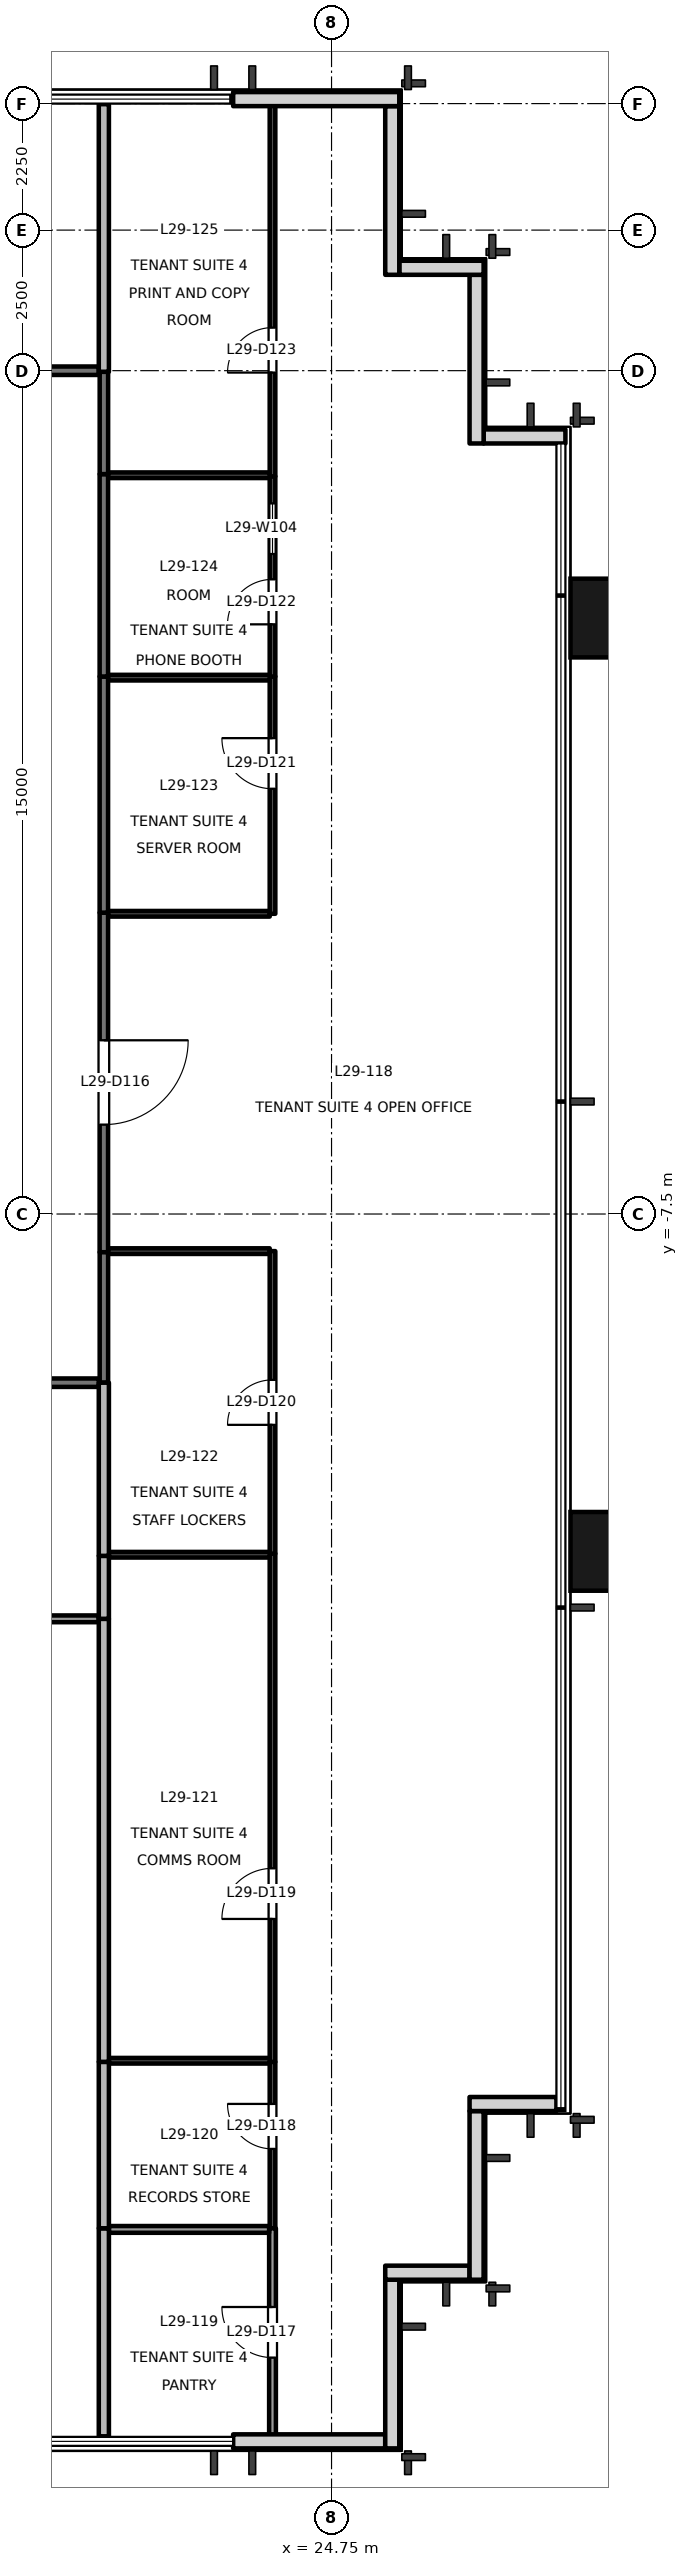
"""IFC4 building model, lengths in metres.
Left out: names, types, materials, properties, quantities, classifications, styles, units other than length and angle.
Written with IfcOpenShell. Run it as: python <this file> out.ifc"""

import sys

from ifc_helpers import new_model, si_unit, direction, frame, frame_2d, origin, origin_2d, place, context, subcontext, project, spatial, rectangle, extrude, element, fill, save


model = new_model("IFC4")
c1 = context("Model", 3, precision=1e-05, world=origin(), true_north=direction((0.0, 1.0)))
c2 = subcontext(c1, "Body", "Model", "MODEL_VIEW")
j1 = project(units=[si_unit("LENGTHUNIT", "METRE"), si_unit("PLANEANGLEUNIT", "RADIAN")], contexts=[c1])
p1 = place(None, origin())
s1 = spatial("IfcSite", under=j1, at=p1, CompositionType="ELEMENT")
p2 = place(p1, origin())
s2 = spatial("IfcBuilding", under=s1, at=p2, CompositionType="ELEMENT")
p3 = place(p2, frame((0.0, 0.0, 130.1)))
s3 = spatial("IfcBuildingStorey", under=s2, at=p3, CompositionType="ELEMENT", Elevation=130.1)
for number, where, z_axis, x_axis in (
    (1, (29.9, -13.5, -0.2), (0.0, 0.0, 1.0), (0.0, 1.0, 0.0)),
    (2, (29.9, 3.1, -0.2), (0.0, 0.0, 1.0), (0.0, 1.0, 0.0)),
):
    element("IfcColumn", number, at=place(p3, frame(where, z_axis=z_axis, x_axis=x_axis)), inside=s3, PredefinedType="COLUMN", context=c2, shape_type="SweptSolid", body=[
        extrude(rectangle(XDim=1.4, YDim=1.8, at=origin_2d()), origin(), (0.0, 0.0, 1.0), 4.0),
    ])
p4 = place(p3, frame((23.0, -29.33, 0.0), z_axis=(0.0, 0.0, 1.0), x_axis=(1.0, 0.0, 0.0)))
e3 = element("IfcWall", 3, at=p4, inside=s3, PredefinedType="SOLIDWALL", context=c2, shape_type="SweptSolid", body=[
    extrude(rectangle(XDim=2.705, YDim=0.25, at=frame_2d((1.353, 0.0))), origin(), (0.0, 0.0, 1.0), 3.8),
])
p5 = place(p3, frame((25.83, -29.455, 0.0), z_axis=(0.0, 0.0, 1.0), x_axis=(0.0, 1.0, 0.0)))
e4 = element("IfcWall", 4, at=p5, inside=s3, PredefinedType="SOLIDWALL", context=c2, shape_type="SweptSolid", body=[
    extrude(rectangle(XDim=3.0, YDim=0.25, at=frame_2d((1.5, 0.0))), origin(), (0.0, 0.0, 1.0), 3.8),
])
p6 = place(p3, frame((25.705, -26.33, 0.0), z_axis=(0.0, 0.0, 1.0), x_axis=(1.0, 0.0, 0.0)))
e5 = element("IfcWall", 5, at=p6, inside=s3, PredefinedType="SOLIDWALL", context=c2, shape_type="SweptSolid", body=[
    extrude(rectangle(XDim=1.5, YDim=0.25, at=frame_2d((0.75, 0.0))), origin(), (0.0, 0.0, 1.0), 3.8),
])
p7 = place(p3, frame((27.33, -26.455, 0.0), z_axis=(0.0, 0.0, 1.0), x_axis=(0.0, 1.0, 0.0)))
e6 = element("IfcWall", 6, at=p7, inside=s3, PredefinedType="SOLIDWALL", context=c2, shape_type="SweptSolid", body=[
    extrude(rectangle(XDim=3.0, YDim=0.25, at=frame_2d((1.5, 0.0))), origin(), (0.0, 0.0, 1.0), 3.8),
])
p8 = place(p3, frame((27.205, -23.33, 0.0), z_axis=(0.0, 0.0, 1.0), x_axis=(1.0, 0.0, 0.0)))
e7 = element("IfcWall", 7, at=p8, inside=s3, PredefinedType="SOLIDWALL", context=c2, shape_type="SweptSolid", body=[
    extrude(rectangle(XDim=1.545, YDim=0.25, at=frame_2d((0.772, 0.0))), origin(), (0.0, 0.0, 1.0), 3.8),
])
p9 = place(p3, frame((28.91, 6.33, 0.0), z_axis=(0.0, 0.0, 1.0), x_axis=(-1.0, 0.0, 0.0)))
e8 = element("IfcWall", 8, at=p9, inside=s3, PredefinedType="SOLIDWALL", context=c2, shape_type="SweptSolid", body=[
    extrude(rectangle(XDim=1.455, YDim=0.25, at=frame_2d((0.728, 0.0))), origin(), (0.0, 0.0, 1.0), 3.8),
])
p10 = place(p3, frame((27.33, 6.205, 0.0), z_axis=(0.0, 0.0, 1.0), x_axis=(0.0, 1.0, 0.0)))
e9 = element("IfcWall", 9, at=p10, inside=s3, PredefinedType="SOLIDWALL", context=c2, shape_type="SweptSolid", body=[
    extrude(rectangle(XDim=3.0, YDim=0.25, at=frame_2d((1.5, 0.0))), origin(), (0.0, 0.0, 1.0), 3.8),
])
p11 = place(p3, frame((27.455, 9.33, 0.0), z_axis=(0.0, 0.0, 1.0), x_axis=(-1.0, 0.0, 0.0)))
e10 = element("IfcWall", 10, at=p11, inside=s3, PredefinedType="SOLIDWALL", context=c2, shape_type="SweptSolid", body=[
    extrude(rectangle(XDim=1.5, YDim=0.25, at=frame_2d((0.75, 0.0))), origin(), (0.0, 0.0, 1.0), 3.8),
])
p12 = place(p3, frame((25.83, 9.205, 0.0), z_axis=(0.0, 0.0, 1.0), x_axis=(0.0, 1.0, 0.0)))
e11 = element("IfcWall", 11, at=p12, inside=s3, PredefinedType="SOLIDWALL", context=c2, shape_type="SweptSolid", body=[
    extrude(rectangle(XDim=3.0, YDim=0.25, at=frame_2d((1.5, 0.0))), origin(), (0.0, 0.0, 1.0), 3.8),
])
p13 = place(p3, frame((25.955, 12.33, 0.0), z_axis=(0.0, 0.0, 1.0), x_axis=(-1.0, 0.0, 0.0)))
e12 = element("IfcWall", 12, at=p13, inside=s3, PredefinedType="SOLIDWALL", context=c2, shape_type="SweptSolid", body=[
    extrude(rectangle(XDim=2.955, YDim=0.25, at=frame_2d((1.478, 0.0))), origin(), (0.0, 0.0, 1.0), 3.8),
])
p14 = place(p3, frame((20.61, -10.5, 0.0), z_axis=(0.0, 0.0, 1.0), x_axis=(-1.0, 0.0, 0.0)))
e13 = element("IfcWall", 13, at=p14, inside=s3, PredefinedType="PARTITIONING", context=c2, shape_type="SweptSolid", body=[
    extrude(rectangle(XDim=8.463, YDim=0.15, at=frame_2d((4.231, 0.0))), origin(), (0.0, 0.0, 1.0), 2.9),
])
p15 = place(p3, frame((20.7, -2.14, 0.0), z_axis=(0.0, 0.0, 1.0), x_axis=(0.0, -1.0, 0.0)))
e14 = element("IfcWall", 14, at=p15, inside=s3, PredefinedType="PARTITIONING", context=c2, shape_type="SweptSolid", body=[
    extrude(rectangle(XDim=6.04, YDim=0.15, at=frame_2d((3.02, 0.0))), origin(), (0.0, 0.0, 1.0), 3.3),
])
p16 = place(p15, frame((2.27, 0.0, 0.0)))
e15 = element("IfcOpeningElement", 15, at=p16, cuts=e14, PredefinedType="OPENING", context=c2, shape_type="SweptSolid", body=[
    extrude(rectangle(XDim=1.5, YDim=2.1, at=frame_2d((0.75, 1.05))), frame((0.0, 0.085, 0.0), z_axis=(0.0, -1.0, 0.0), x_axis=(1.0, 0.0, 0.0)), (0.0, 0.0, 1.0), 0.171),
])
p17 = place(p3, frame((20.701, -8.18, 0.0), z_axis=(0.0, 0.0, 1.0), x_axis=(0.0, -1.0, 0.0)))
e16 = element("IfcWall", 16, at=p17, inside=s3, PredefinedType="PARTITIONING", context=c2, shape_type="SweptSolid", body=[
    extrude(rectangle(XDim=2.32, YDim=0.15, at=frame_2d((1.16, 0.0))), origin(), (0.0, 0.0, 1.0), 3.8),
])
p18 = place(p3, frame((20.7, 2.06, 0.0), z_axis=(0.0, 0.0, 1.0), x_axis=(0.0, -1.0, 0.0)))
e17 = element("IfcWall", 17, at=p18, inside=s3, PredefinedType="PARTITIONING", context=c2, shape_type="SweptSolid", body=[
    extrude(rectangle(XDim=4.2, YDim=0.15, at=frame_2d((2.1, 0.0))), origin(), (0.0, 0.0, 1.0), 3.3),
])
p19 = place(p3, frame((20.7, 5.66, 0.0), z_axis=(0.0, 0.0, 1.0), x_axis=(0.0, -1.0, 0.0)))
e18 = element("IfcWall", 18, at=p19, inside=s3, PredefinedType="PARTITIONING", context=c2, shape_type="SweptSolid", body=[
    extrude(rectangle(XDim=3.6, YDim=0.15, at=frame_2d((1.8, 0.0))), origin(), (0.0, 0.0, 1.0), 3.3),
])
p20 = place(p3, frame((20.701, 7.48, 0.0), z_axis=(0.0, 0.0, 1.0), x_axis=(0.0, -1.0, 0.0)))
e19 = element("IfcWall", 19, at=p20, inside=s3, PredefinedType="PARTITIONING", context=c2, shape_type="SweptSolid", body=[
    extrude(rectangle(XDim=1.82, YDim=0.15, at=frame_2d((0.91, 0.0))), origin(), (0.0, 0.0, 1.0), 3.8),
])
p21 = place(p3, frame((18.0, 7.499, 0.0), z_axis=(0.0, 0.0, 1.0), x_axis=(1.0, 0.0, 0.0)))
e20 = element("IfcWall", 20, at=p21, inside=s3, PredefinedType="PARTITIONING", context=c2, shape_type="SweptSolid", body=[
    extrude(rectangle(XDim=2.61, YDim=0.15, at=frame_2d((1.305, 0.0))), origin(), (0.0, 0.0, 1.0), 3.8),
])
p22 = place(p3, frame((12.167, -14.7, 0.0), z_axis=(0.0, 0.0, 1.0), x_axis=(1.0, 0.0, 0.0)))
e21 = element("IfcWall", 21, at=p22, inside=s3, PredefinedType="PARTITIONING", context=c2, shape_type="SweptSolid", body=[
    extrude(rectangle(XDim=8.443, YDim=0.12, at=frame_2d((4.222, 0.0))), origin(), (0.0, 0.0, 1.0), 2.9),
])
p23 = place(p22, frame((3.771, 0.0, 0.0)))
e22 = element("IfcOpeningElement", 22, at=p23, cuts=e21, PredefinedType="OPENING", context=c2, shape_type="SweptSolid", body=[
    extrude(rectangle(XDim=0.9, YDim=2.1, at=frame_2d((0.45, 1.05))), frame((0.0, 0.071, 0.0), z_axis=(0.0, -1.0, 0.0), x_axis=(1.0, 0.0, 0.0)), (0.0, 0.0, 1.0), 0.141),
])
p24 = place(p3, frame((20.7, -25.54, 0.0), z_axis=(0.0, 0.0, 1.0), x_axis=(0.0, -1.0, 0.0)))
e23 = element("IfcWall", 23, at=p24, inside=s3, PredefinedType="PARTITIONING", context=c2, shape_type="SweptSolid", body=[
    extrude(rectangle(XDim=3.7, YDim=0.18, at=frame_2d((1.85, 0.0))), origin(), (0.0, 0.0, 1.0), 3.8),
])
p25 = place(p3, frame((20.7, -22.58, 0.0), z_axis=(0.0, 0.0, 1.0), x_axis=(0.0, -1.0, 0.0)))
e24 = element("IfcWall", 24, at=p25, inside=s3, PredefinedType="PARTITIONING", context=c2, shape_type="SweptSolid", body=[
    extrude(rectangle(XDim=2.96, YDim=0.18, at=frame_2d((1.48, 0.0))), origin(), (0.0, 0.0, 1.0), 3.8),
])
p26 = place(p3, frame((20.7, -14.7, 0.0), z_axis=(0.0, 0.0, 1.0), x_axis=(0.0, -1.0, 0.0)))
e25 = element("IfcWall", 25, at=p26, inside=s3, PredefinedType="PARTITIONING", context=c2, shape_type="SweptSolid", body=[
    extrude(rectangle(XDim=7.88, YDim=0.18, at=frame_2d((3.94, 0.0))), origin(), (0.0, 0.0, 1.0), 3.8),
])
p27 = place(p3, frame((20.7, -13.58, 0.0), z_axis=(0.0, 0.0, 1.0), x_axis=(0.0, -1.0, 0.0)))
e26 = element("IfcWall", 26, at=p27, inside=s3, PredefinedType="PARTITIONING", context=c2, shape_type="SweptSolid", body=[
    extrude(rectangle(XDim=1.12, YDim=0.18, at=frame_2d((0.56, 0.0))), origin(), (0.0, 0.0, 1.0), 3.8),
])
p28 = place(p3, frame((20.7, -10.5, 0.0), z_axis=(0.0, 0.0, 1.0), x_axis=(0.0, -1.0, 0.0)))
e27 = element("IfcWall", 27, at=p28, inside=s3, PredefinedType="PARTITIONING", context=c2, shape_type="SweptSolid", body=[
    extrude(rectangle(XDim=3.08, YDim=0.18, at=frame_2d((1.54, 0.0))), origin(), (0.0, 0.0, 1.0), 3.8),
])
p29 = place(p3, frame((23.7, -29.24, 0.0), z_axis=(0.0, 0.0, 1.0), x_axis=(0.0, 1.0, 0.0)))
e28 = element("IfcWall", 28, at=p29, inside=s3, PredefinedType="PARTITIONING", context=c2, shape_type="SweptSolid", body=[
    extrude(rectangle(XDim=3.7, YDim=0.12, at=frame_2d((1.85, 0.0))), origin(), (0.0, 0.0, 1.0), 3.8),
])
p30 = place(p29, frame((1.4, 0.0, 0.0)))
e29 = element("IfcOpeningElement", 29, at=p30, cuts=e28, PredefinedType="OPENING", context=c2, shape_type="SweptSolid", body=[
    extrude(rectangle(XDim=0.9, YDim=2.1, at=frame_2d((0.45, 1.05))), frame((0.0, 0.071, 0.0), z_axis=(0.0, -1.0, 0.0), x_axis=(1.0, 0.0, 0.0)), (0.0, 0.0, 1.0), 0.141),
])
p31 = place(p3, frame((23.7, -25.54, 0.0), z_axis=(0.0, 0.0, 1.0), x_axis=(0.0, 1.0, 0.0)))
e30 = element("IfcWall", 30, at=p31, inside=s3, PredefinedType="PARTITIONING", context=c2, shape_type="SweptSolid", body=[
    extrude(rectangle(XDim=2.96, YDim=0.1, at=frame_2d((1.48, 0.0))), origin(), (0.0, 0.0, 1.0), 3.8),
])
p32 = place(p31, frame((1.412, 0.0, 0.0)))
e31 = element("IfcOpeningElement", 31, at=p32, cuts=e30, PredefinedType="OPENING", context=c2, shape_type="SweptSolid", body=[
    extrude(rectangle(XDim=0.8, YDim=2.1, at=frame_2d((0.4, 1.05))), frame((0.0, 0.061, 0.0), z_axis=(0.0, -1.0, 0.0), x_axis=(1.0, 0.0, 0.0)), (0.0, 0.0, 1.0), 0.121),
])
p33 = place(p3, frame((23.7, -22.58, 0.0), z_axis=(0.0, 0.0, 1.0), x_axis=(0.0, 1.0, 0.0)))
e32 = element("IfcWall", 32, at=p33, inside=s3, PredefinedType="PARTITIONING", context=c2, shape_type="SweptSolid", body=[
    extrude(rectangle(XDim=9.04, YDim=0.1, at=frame_2d((4.52, 0.0))), origin(), (0.0, 0.0, 1.0), 3.8),
])
p34 = place(p33, frame((2.542, 0.0, 0.0)))
e33 = element("IfcOpeningElement", 33, at=p34, cuts=e32, PredefinedType="OPENING", context=c2, shape_type="SweptSolid", body=[
    extrude(rectangle(XDim=0.9, YDim=2.1, at=frame_2d((0.45, 1.05))), frame((0.0, 0.061, 0.0), z_axis=(0.0, -1.0, 0.0), x_axis=(1.0, 0.0, 0.0)), (0.0, 0.0, 1.0), 0.121),
])
p35 = place(p3, frame((23.65, -8.16, 0.0), z_axis=(0.0, 0.0, 1.0), x_axis=(-1.0, 0.0, 0.0)))
e34 = element("IfcWall", 34, at=p35, inside=s3, PredefinedType="PARTITIONING", context=c2, shape_type="SweptSolid", body=[
    extrude(rectangle(XDim=2.875, YDim=0.1, at=frame_2d((1.438, 0.0))), origin(), (0.0, 0.0, 1.0), 3.8),
])
p36 = place(p3, frame((23.7, -13.54, 0.0), z_axis=(0.0, 0.0, 1.0), x_axis=(0.0, 1.0, 0.0)))
e35 = element("IfcWall", 35, at=p36, inside=s3, PredefinedType="PARTITIONING", context=c2, shape_type="SweptSolid", body=[
    extrude(rectangle(XDim=5.38, YDim=0.1, at=frame_2d((2.69, 0.0))), origin(), (0.0, 0.0, 1.0), 3.8),
])
p37 = place(p36, frame((2.29, 0.0, 0.0)))
e36 = element("IfcOpeningElement", 36, at=p37, cuts=e35, PredefinedType="OPENING", context=c2, shape_type="SweptSolid", body=[
    extrude(rectangle(XDim=0.8, YDim=2.1, at=frame_2d((0.4, 1.05))), frame((0.0, 0.061, 0.0), z_axis=(0.0, -1.0, 0.0), x_axis=(1.0, 0.0, 0.0)), (0.0, 0.0, 1.0), 0.121),
])
p38 = place(p3, frame((20.775, -2.16, 0.0), z_axis=(0.0, 0.0, 1.0), x_axis=(1.0, 0.0, 0.0)))
e37 = element("IfcWall", 37, at=p38, inside=s3, PredefinedType="PARTITIONING", context=c2, shape_type="SweptSolid", body=[
    extrude(rectangle(XDim=2.875, YDim=0.1, at=frame_2d((1.438, 0.0))), origin(), (0.0, 0.0, 1.0), 3.8),
])
p39 = place(p3, frame((23.7, -2.16, 0.0), z_axis=(0.0, 0.0, 1.0), x_axis=(0.0, 1.0, 0.0)))
e38 = element("IfcWall", 38, at=p39, inside=s3, PredefinedType="PARTITIONING", context=c2, shape_type="SweptSolid", body=[
    extrude(rectangle(XDim=4.22, YDim=0.1, at=frame_2d((2.11, 0.0))), origin(), (0.0, 0.0, 1.0), 3.3),
])
p40 = place(p39, frame((2.224, 0.0, 0.0)))
e39 = element("IfcOpeningElement", 39, at=p40, cuts=e38, PredefinedType="OPENING", context=c2, shape_type="SweptSolid", body=[
    extrude(rectangle(XDim=0.9, YDim=2.1, at=frame_2d((0.45, 1.05))), frame((0.0, 0.061, 0.0), z_axis=(0.0, -1.0, 0.0), x_axis=(1.0, 0.0, 0.0)), (0.0, 0.0, 1.0), 0.121),
])
p41 = place(p3, frame((23.7, 2.06, 0.0), z_axis=(0.0, 0.0, 1.0), x_axis=(0.0, 1.0, 0.0)))
e40 = element("IfcWall", 40, at=p41, inside=s3, PredefinedType="PARTITIONING", context=c2, shape_type="SweptSolid", body=[
    extrude(rectangle(XDim=3.56, YDim=0.1, at=frame_2d((1.78, 0.0))), origin(), (0.0, 0.0, 1.0), 3.3),
])
p42 = place(p41, frame((0.928, 0.0, 0.0)))
e41 = element("IfcOpeningElement", 41, at=p42, cuts=e40, PredefinedType="OPENING", context=c2, shape_type="SweptSolid", body=[
    extrude(rectangle(XDim=0.8, YDim=2.1, at=frame_2d((0.4, 1.05))), frame((0.0, 0.061, 0.0), z_axis=(0.0, -1.0, 0.0), x_axis=(1.0, 0.0, 0.0)), (0.0, 0.0, 1.0), 0.121),
])
p43 = place(p41, frame((2.179, 0.0, 0.9)))
e42 = element("IfcOpeningElement", 42, at=p43, cuts=e40, PredefinedType="OPENING", context=c2, shape_type="SweptSolid", body=[
    extrude(rectangle(XDim=0.9, YDim=1.2, at=frame_2d((0.45, 0.6))), frame((0.0, 0.061, 0.0), z_axis=(0.0, -1.0, 0.0), x_axis=(1.0, 0.0, 0.0)), (0.0, 0.0, 1.0), 0.121),
])
p44 = place(p3, frame((23.7, 5.62, 0.0), z_axis=(0.0, 0.0, 1.0), x_axis=(0.0, 1.0, 0.0)))
e43 = element("IfcWall", 43, at=p44, inside=s3, PredefinedType="PARTITIONING", context=c2, shape_type="SweptSolid", body=[
    extrude(rectangle(XDim=6.62, YDim=0.1, at=frame_2d((3.31, 0.0))), origin(), (0.0, 0.0, 1.0), 3.8),
])
p45 = place(p44, frame((1.846, 0.0, 0.0)))
e44 = element("IfcOpeningElement", 44, at=p45, cuts=e43, PredefinedType="OPENING", context=c2, shape_type="SweptSolid", body=[
    extrude(rectangle(XDim=0.8, YDim=2.1, at=frame_2d((0.4, 1.05))), frame((0.0, 0.061, 0.0), z_axis=(0.0, -1.0, 0.0), x_axis=(1.0, 0.0, 0.0)), (0.0, 0.0, 1.0), 0.121),
])
p46 = place(p3, frame((20.79, -25.56, 0.0), z_axis=(0.0, 0.0, 1.0), x_axis=(1.0, 0.0, 0.0)))
e45 = element("IfcWall", 45, at=p46, inside=s3, PredefinedType="PARTITIONING", context=c2, shape_type="SweptSolid", body=[
    extrude(rectangle(XDim=2.85, YDim=0.12, at=frame_2d((1.425, 0.0))), origin(), (0.0, 0.0, 1.0), 3.8),
])
for number, where, z_axis, x_axis in (
    (46, (20.79, -22.56, 0.0), (0.0, 0.0, 1.0), (1.0, 0.0, 0.0)),
    (47, (20.79, -13.56, 0.0), (0.0, 0.0, 1.0), (1.0, 0.0, 0.0)),
):
    element("IfcWall", number, at=place(p3, frame(where, z_axis=z_axis, x_axis=x_axis)), inside=s3, PredefinedType="PARTITIONING", context=c2, shape_type="SweptSolid", body=[
        extrude(rectangle(XDim=2.86, YDim=0.1, at=frame_2d((1.43, 0.0))), origin(), (0.0, 0.0, 1.0), 3.8),
    ])
for number, where, z_axis, x_axis in (
    (48, (20.775, 2.04, 0.0), (0.0, 0.0, 1.0), (1.0, 0.0, 0.0)),
    (49, (20.775, 5.64, 0.0), (0.0, 0.0, 1.0), (1.0, 0.0, 0.0)),
):
    element("IfcWall", number, at=place(p3, frame(where, z_axis=z_axis, x_axis=x_axis)), inside=s3, PredefinedType="PARTITIONING", context=c2, shape_type="SweptSolid", body=[
        extrude(rectangle(XDim=2.875, YDim=0.1, at=frame_2d((1.438, 0.0))), origin(), (0.0, 0.0, 1.0), 3.8),
    ])
p47 = place(p3, frame((20.7, 7.48, 0.0), z_axis=(0.0, 0.0, 1.0), x_axis=(0.0, 1.0, 0.0)))
e50 = element("IfcWall", 50, at=p47, inside=s3, PredefinedType="PARTITIONING", context=c2, shape_type="SweptSolid", body=[
    extrude(rectangle(XDim=4.76, YDim=0.18, at=frame_2d((2.38, 0.0))), origin(), (0.0, 0.0, 1.0), 3.8),
])
p48 = place(p16, origin())
e51 = element("IfcDoor", 51, at=p48, inside=s3, OperationType="DOUBLE_DOOR_SINGLE_SWING", PredefinedType="DOOR", context=c2, shape_type="SweptSolid", body=[
    extrude(rectangle(XDim=1.5, YDim=2.1, at=frame_2d((0.75, 1.05))), frame((0.0, 0.025, 0.0), z_axis=(0.0, -1.0, 0.0), x_axis=(1.0, 0.0, 0.0)), (0.0, 0.0, 1.0), 0.05),
])
fill(e15, e51)
p49 = place(p30, origin())
e52 = element("IfcDoor", 52, at=p49, inside=s3, OperationType="SINGLE_SWING_RIGHT", PredefinedType="DOOR", context=c2, shape_type="SweptSolid", body=[
    extrude(rectangle(XDim=0.9, YDim=2.1, at=frame_2d((0.45, 1.05))), frame((0.0, 0.025, 0.0), z_axis=(0.0, -1.0, 0.0), x_axis=(1.0, 0.0, 0.0)), (0.0, 0.0, 1.0), 0.05),
])
fill(e29, e52)
p50 = place(p32, origin())
e53 = element("IfcDoor", 53, at=p50, inside=s3, OperationType="SINGLE_SWING_RIGHT", PredefinedType="DOOR", context=c2, shape_type="SweptSolid", body=[
    extrude(rectangle(XDim=0.8, YDim=2.1, at=frame_2d((0.4, 1.05))), frame((0.0, 0.025, 0.0), z_axis=(0.0, -1.0, 0.0), x_axis=(1.0, 0.0, 0.0)), (0.0, 0.0, 1.0), 0.05),
])
fill(e31, e53)
p51 = place(p34, origin())
e54 = element("IfcDoor", 54, at=p51, inside=s3, OperationType="SINGLE_SWING_LEFT", PredefinedType="DOOR", context=c2, shape_type="SweptSolid", body=[
    extrude(rectangle(XDim=0.9, YDim=2.1, at=frame_2d((0.45, 1.05))), frame((0.0, 0.025, 0.0), z_axis=(0.0, -1.0, 0.0), x_axis=(1.0, 0.0, 0.0)), (0.0, 0.0, 1.0), 0.05),
])
fill(e33, e54)
p52 = place(p37, origin())
e55 = element("IfcDoor", 55, at=p52, inside=s3, OperationType="SINGLE_SWING_LEFT", PredefinedType="DOOR", context=c2, shape_type="SweptSolid", body=[
    extrude(rectangle(XDim=0.8, YDim=2.1, at=frame_2d((0.4, 1.05))), frame((0.0, 0.025, 0.0), z_axis=(0.0, -1.0, 0.0), x_axis=(1.0, 0.0, 0.0)), (0.0, 0.0, 1.0), 0.05),
])
fill(e36, e55)
p53 = place(p40, origin())
e56 = element("IfcDoor", 56, at=p53, inside=s3, OperationType="SINGLE_SWING_RIGHT", PredefinedType="DOOR", context=c2, shape_type="SweptSolid", body=[
    extrude(rectangle(XDim=0.9, YDim=2.1, at=frame_2d((0.45, 1.05))), frame((0.0, 0.025, 0.0), z_axis=(0.0, -1.0, 0.0), x_axis=(1.0, 0.0, 0.0)), (0.0, 0.0, 1.0), 0.05),
])
fill(e39, e56)
p54 = place(p42, origin())
e57 = element("IfcDoor", 57, at=p54, inside=s3, OperationType="SINGLE_SWING_LEFT", PredefinedType="DOOR", context=c2, shape_type="SweptSolid", body=[
    extrude(rectangle(XDim=0.8, YDim=2.1, at=frame_2d((0.4, 1.05))), frame((0.0, 0.025, 0.0), z_axis=(0.0, -1.0, 0.0), x_axis=(1.0, 0.0, 0.0)), (0.0, 0.0, 1.0), 0.05),
])
fill(e41, e57)
p55 = place(p45, origin())
e58 = element("IfcDoor", 58, at=p55, inside=s3, OperationType="SINGLE_SWING_LEFT", PredefinedType="DOOR", context=c2, shape_type="SweptSolid", body=[
    extrude(rectangle(XDim=0.8, YDim=2.1, at=frame_2d((0.4, 1.05))), frame((0.0, 0.025, 0.0), z_axis=(0.0, -1.0, 0.0), x_axis=(1.0, 0.0, 0.0)), (0.0, 0.0, 1.0), 0.05),
])
fill(e44, e58)
p56 = place(p43, origin())
e59 = element("IfcWindow", 59, at=p56, inside=s3, PartitioningType="SINGLE_PANEL", PredefinedType="WINDOW", context=c2, shape_type="SweptSolid", body=[
    extrude(rectangle(XDim=0.9, YDim=1.2, at=frame_2d((0.45, 0.6))), frame((0.0, 0.03, 0.0), z_axis=(0.0, -1.0, 0.0), x_axis=(1.0, 0.0, 0.0)), (0.0, 0.0, 1.0), 0.06),
])
fill(e42, e59)
save(model, sys.argv[1])
